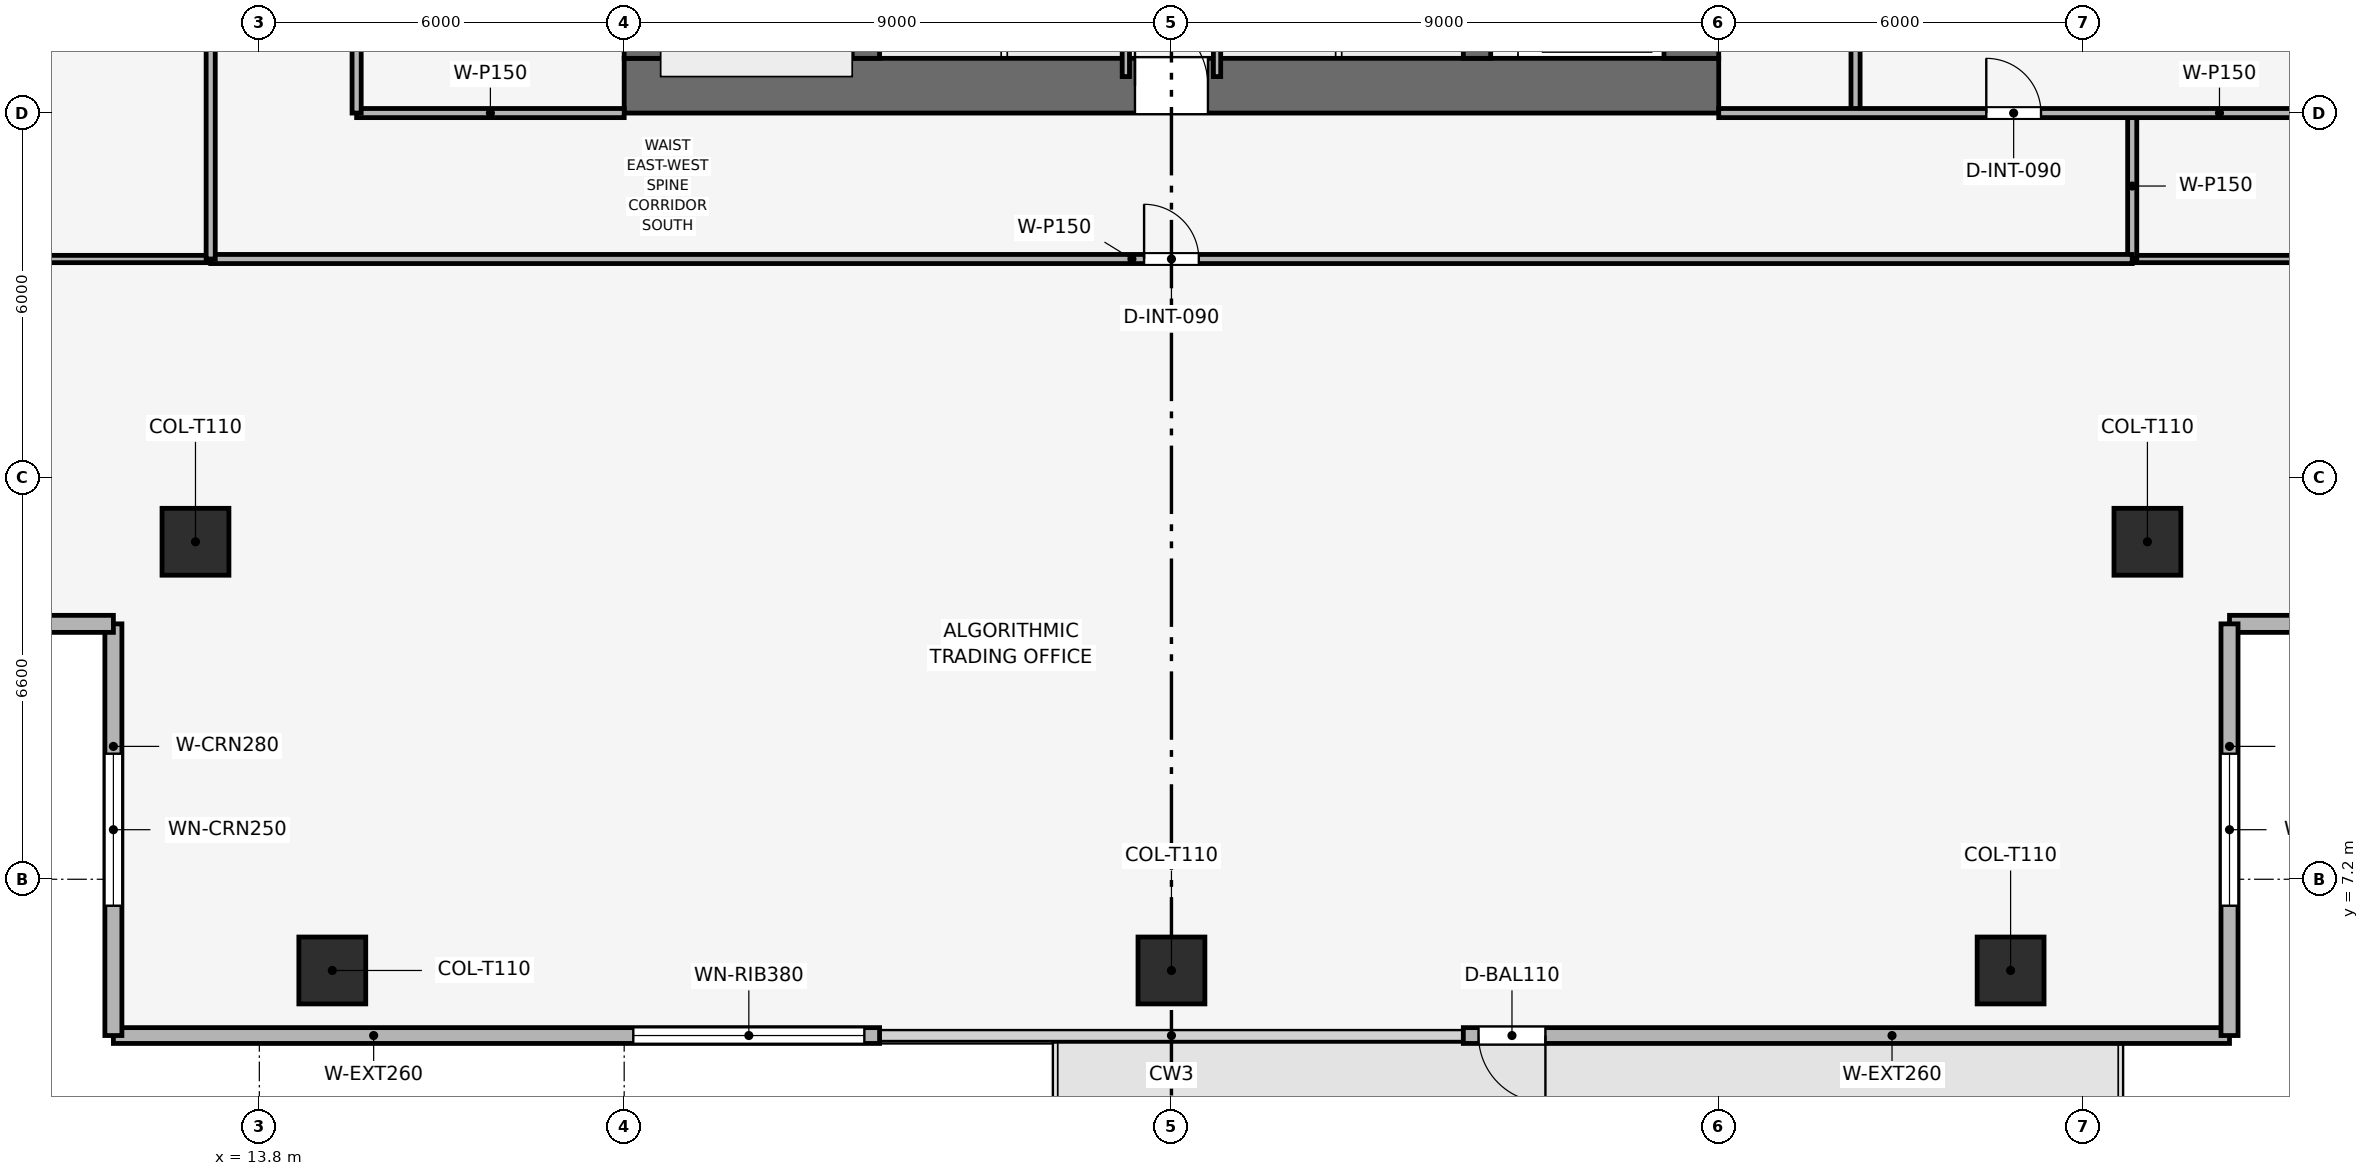
"""IFC4 building model, lengths in metres.
Left out: names, types, materials, properties, quantities, classifications, styles, units other than length and angle.
Written with IfcOpenShell. Run it as: python <this file> out.ifc"""

import sys

from ifc_helpers import new_model, si_unit, direction, frame, frame_2d, origin, origin_2d, place, context, subcontext, project, spatial, rectangle, extrude, element, fill, save


model = new_model("IFC4")
c1 = context("Model", 3, precision=1e-05, world=origin(), true_north=direction((0.0, 1.0)))
c2 = subcontext(c1, "Body", "Model", "MODEL_VIEW")
j1 = project(units=[si_unit("LENGTHUNIT", "METRE"), si_unit("PLANEANGLEUNIT", "RADIAN")], contexts=[c1])
p1 = place(None, origin())
s1 = spatial("IfcSite", under=j1, at=p1, CompositionType="ELEMENT")
p2 = place(p1, origin())
s2 = spatial("IfcBuilding", under=s1, at=p2, CompositionType="ELEMENT")
p3 = place(p2, frame((0.0, 0.0, 157.05)))
s3 = spatial("IfcBuildingStorey", under=s2, at=p3, CompositionType="ELEMENT", Elevation=157.05)
p4 = place(p3, frame((19.8, 20.25, 0.0), z_axis=(0.0, 0.0, 1.0), x_axis=(1.0, 0.0, 0.0)))
e1 = element("IfcWall", 1, at=p4, inside=s3, PredefinedType="SHEAR", context=c2, shape_type="SweptSolid", body=[
    extrude(rectangle(XDim=18.0, YDim=0.9, at=frame_2d((9.0, 0.0))), origin(), (0.0, 0.0, 1.0), 3.75),
])
p5 = place(p4, frame((8.4, 0.0, 0.0)))
e2 = element("IfcOpeningElement", 2, at=p5, cuts=e1, PredefinedType="OPENING", context=c2, shape_type="SweptSolid", body=[
    extrude(rectangle(XDim=1.2, YDim=2.2, at=frame_2d((0.6, 1.1))), frame((0.0, 0.46, 0.0), z_axis=(0.0, -1.0, 0.0), x_axis=(1.0, 0.0, 0.0)), (0.0, 0.0, 1.0), 0.92),
])
p6 = place(p3, frame((20.25, 20.7, 0.0), z_axis=(0.0, 0.0, 1.0), x_axis=(0.0, 1.0, 0.0)))
e3 = element("IfcWall", 3, at=p6, inside=s3, PredefinedType="SHEAR", context=c2, shape_type="SweptSolid", body=[
    extrude(rectangle(XDim=16.2, YDim=0.9, at=frame_2d((8.1, 0.0))), origin(), (0.0, 0.0, 1.0), 3.75),
])
p7 = place(p6, frame((10.1, 0.0, 0.0)))
e4 = element("IfcOpeningElement", 4, at=p7, cuts=e3, PredefinedType="OPENING", context=c2, shape_type="SweptSolid", body=[
    extrude(rectangle(XDim=1.1, YDim=2.15, at=frame_2d((0.55, 1.075))), frame((0.0, 0.46, 0.0), z_axis=(0.0, -1.0, 0.0), x_axis=(1.0, 0.0, 0.0)), (0.0, 0.0, 1.0), 0.92),
])
p8 = place(p3, frame((37.35, 20.7, 0.0), z_axis=(0.0, 0.0, 1.0), x_axis=(0.0, 1.0, 0.0)))
e5 = element("IfcWall", 5, at=p8, inside=s3, PredefinedType="SHEAR", context=c2, shape_type="SweptSolid", body=[
    extrude(rectangle(XDim=16.2, YDim=0.9, at=frame_2d((8.1, 0.0))), origin(), (0.0, 0.0, 1.0), 3.75),
])
p9 = place(p8, frame((4.6, 0.0, 0.0)))
e6 = element("IfcOpeningElement", 6, at=p9, cuts=e5, PredefinedType="OPENING", context=c2, shape_type="SweptSolid", body=[
    extrude(rectangle(XDim=1.1, YDim=2.15, at=frame_2d((0.55, 1.075))), frame((0.0, 0.46, 0.0), z_axis=(0.0, -1.0, 0.0), x_axis=(1.0, 0.0, 0.0)), (0.0, 0.0, 1.0), 0.92),
])
for number, where, z_axis, x_axis in (
    (7, (23.775, 20.7, 0.0), (0.0, 0.0, 1.0), (0.0, 1.0, 0.0)),
    (8, (33.825, 20.7, 0.0), (0.0, 0.0, 1.0), (0.0, 1.0, 0.0)),
):
    element("IfcWall", number, at=place(p3, frame(where, z_axis=z_axis, x_axis=x_axis)), inside=s3, PredefinedType="SHEAR", context=c2, shape_type="SweptSolid", body=[
        extrude(rectangle(XDim=16.2, YDim=0.45, at=frame_2d((8.1, 0.0))), origin(), (0.0, 0.0, 1.0), 3.75),
    ])
for number, where, z_axis, x_axis in (
    (9, (15.0, 5.7, 0.003), (0.0, 0.0, 1.0), (1.0, 0.0, 0.0)),
    (10, (28.8, 5.7, 0.003), (0.0, 0.0, 1.0), (1.0, 0.0, 0.0)),
    (11, (42.6, 5.7, 0.003), (0.0, 0.0, 1.0), (1.0, 0.0, 0.0)),
    (12, (12.75, 12.75, 0.003), (0.0, 0.0, 1.0), (1.0, 0.0, 0.0)),
    (13, (44.85, 12.75, 0.003), (0.0, 0.0, 1.0), (1.0, 0.0, 0.0)),
):
    element("IfcColumn", number, at=place(p3, frame(where, z_axis=z_axis, x_axis=x_axis)), inside=s3, PredefinedType="COLUMN", context=c2, shape_type="SweptSolid", body=[
        extrude(rectangle(XDim=1.1, YDim=1.1, at=origin_2d()), origin(), (0.0, 0.0, 1.0), 3.489),
    ])
p10 = place(p3, frame((46.2, 4.63, 0.0), z_axis=(0.0, 0.0, 1.0), x_axis=(-1.0, 0.0, 0.0)))
e14 = element("IfcWall", 14, at=p10, inside=s3, PredefinedType="SOLIDWALL", context=c2, shape_type="SweptSolid", body=[
    extrude(rectangle(XDim=12.6, YDim=0.26, at=frame_2d((6.3, 0.0))), origin(), (0.0, 0.0, 1.0), 3.495),
])
p11 = place(p10, frame((11.25, 0.0, 0.0)))
e15 = element("IfcOpeningElement", 15, at=p11, cuts=e14, PredefinedType="OPENING", context=c2, shape_type="SweptSolid", body=[
    extrude(rectangle(XDim=1.1, YDim=2.2, at=frame_2d((0.55, 1.1))), frame((0.0, 0.14, 0.0), z_axis=(0.0, -1.0, 0.0), x_axis=(1.0, 0.0, 0.0)), (0.0, 0.0, 1.0), 0.28),
])
p12 = place(p3, frame((24.0, 4.63, 0.0), z_axis=(0.0, 0.0, 1.0), x_axis=(-1.0, 0.0, 0.0)))
e16 = element("IfcWall", 16, at=p12, inside=s3, PredefinedType="SOLIDWALL", context=c2, shape_type="SweptSolid", body=[
    extrude(rectangle(XDim=12.6, YDim=0.26, at=frame_2d((6.3, 0.0))), origin(), (0.0, 0.0, 1.0), 3.495),
])
p13 = place(p12, frame((0.25, 0.0, 0.9)))
e17 = element("IfcOpeningElement", 17, at=p13, cuts=e16, PredefinedType="OPENING", context=c2, shape_type="SweptSolid", body=[
    extrude(rectangle(XDim=3.8, YDim=1.9, at=frame_2d((1.9, 0.95))), frame((0.0, 0.14, 0.0), z_axis=(0.0, -1.0, 0.0), x_axis=(1.0, 0.0, 0.0)), (0.0, 0.0, 1.0), 0.28),
])
p14 = place(p3, frame((11.4, 4.63, 0.0), z_axis=(0.0, 0.0, 1.0), x_axis=(0.0, 1.0, 0.0)))
e18 = element("IfcWall", 18, at=p14, inside=s3, PredefinedType="SOLIDWALL", context=c2, shape_type="SweptSolid", body=[
    extrude(rectangle(XDim=6.77, YDim=0.28, at=frame_2d((3.385, 0.0))), origin(), (0.0, 0.0, 1.0), 3.495),
])
p15 = place(p14, frame((2.135, 0.0, 0.9)))
e19 = element("IfcOpeningElement", 19, at=p15, cuts=e18, PredefinedType="OPENING", context=c2, shape_type="SweptSolid", body=[
    extrude(rectangle(XDim=2.5, YDim=1.9, at=frame_2d((1.25, 0.95))), frame((0.0, 0.15, 0.0), z_axis=(0.0, -1.0, 0.0), x_axis=(1.0, 0.0, 0.0)), (0.0, 0.0, 1.0), 0.3),
])
p16 = place(p3, frame((11.4, 11.4, 0.0), z_axis=(0.0, 0.0, 1.0), x_axis=(-1.0, 0.0, 0.0)))
e20 = element("IfcWall", 20, at=p16, inside=s3, PredefinedType="SOLIDWALL", context=c2, shape_type="SweptSolid", body=[
    extrude(rectangle(XDim=6.77, YDim=0.28, at=frame_2d((3.385, 0.0))), origin(), (0.0, 0.0, 1.0), 3.495),
])
p17 = place(p16, frame((2.135, 0.0, 0.9)))
e21 = element("IfcOpeningElement", 21, at=p17, cuts=e20, PredefinedType="OPENING", context=c2, shape_type="SweptSolid", body=[
    extrude(rectangle(XDim=2.5, YDim=1.9, at=frame_2d((1.25, 0.95))), frame((0.0, 0.15, 0.0), z_axis=(0.0, -1.0, 0.0), x_axis=(1.0, 0.0, 0.0)), (0.0, 0.0, 1.0), 0.3),
])
p18 = place(p3, frame((52.97, 11.4, 0.0), z_axis=(0.0, 0.0, 1.0), x_axis=(-1.0, 0.0, 0.0)))
e22 = element("IfcWall", 22, at=p18, inside=s3, PredefinedType="SOLIDWALL", context=c2, shape_type="SweptSolid", body=[
    extrude(rectangle(XDim=6.77, YDim=0.28, at=frame_2d((3.385, 0.0))), origin(), (0.0, 0.0, 1.0), 3.495),
])
p19 = place(p18, frame((2.135, 0.0, 0.9)))
e23 = element("IfcOpeningElement", 23, at=p19, cuts=e22, PredefinedType="OPENING", context=c2, shape_type="SweptSolid", body=[
    extrude(rectangle(XDim=2.5, YDim=1.9, at=frame_2d((1.25, 0.95))), frame((0.0, 0.15, 0.0), z_axis=(0.0, -1.0, 0.0), x_axis=(1.0, 0.0, 0.0)), (0.0, 0.0, 1.0), 0.3),
])
p20 = place(p3, frame((46.2, 11.4, 0.0), z_axis=(0.0, 0.0, 1.0), x_axis=(0.0, -1.0, 0.0)))
e24 = element("IfcWall", 24, at=p20, inside=s3, PredefinedType="SOLIDWALL", context=c2, shape_type="SweptSolid", body=[
    extrude(rectangle(XDim=6.77, YDim=0.28, at=frame_2d((3.385, 0.0))), origin(), (0.0, 0.0, 1.0), 3.495),
])
p21 = place(p20, frame((2.135, 0.0, 0.9)))
e25 = element("IfcOpeningElement", 25, at=p21, cuts=e24, PredefinedType="OPENING", context=c2, shape_type="SweptSolid", body=[
    extrude(rectangle(XDim=2.5, YDim=1.9, at=frame_2d((1.25, 0.95))), frame((0.0, 0.15, 0.0), z_axis=(0.0, -1.0, 0.0), x_axis=(1.0, 0.0, 0.0)), (0.0, 0.0, 1.0), 0.3),
])
for number, where, z_axis, x_axis in (
    (26, (28.05, 20.4, 0.0), (0.0, 0.0, 1.0), (0.0, 1.0, 0.0)),
    (27, (29.55, 20.4, 0.0), (0.0, 0.0, 1.0), (0.0, 1.0, 0.0)),
):
    element("IfcWall", number, at=place(p3, frame(where, z_axis=z_axis, x_axis=x_axis)), inside=s3, PredefinedType="PARTITIONING", context=c2, shape_type="SweptSolid", body=[
        extrude(rectangle(XDim=2.75, YDim=0.12, at=frame_2d((1.375, 0.0))), origin(), (0.0, 0.0, 1.0), 3.495),
    ])
p22 = place(p3, frame((15.4, 19.8, 0.0), z_axis=(0.0, 0.0, 1.0), x_axis=(1.0, 0.0, 0.0)))
e28 = element("IfcWall", 28, at=p22, inside=s3, PredefinedType="PARTITIONING", context=c2, shape_type="SweptSolid", body=[
    extrude(rectangle(XDim=4.4, YDim=0.15, at=frame_2d((2.2, 0.0))), origin(), (0.0, 0.0, 1.0), 3.03),
])
p23 = place(p3, frame((15.4, 19.8, 0.0), z_axis=(0.0, 0.0, 1.0), x_axis=(0.0, 1.0, 0.0)))
e29 = element("IfcWall", 29, at=p23, inside=s3, PredefinedType="PARTITIONING", context=c2, shape_type="SweptSolid", body=[
    extrude(rectangle(XDim=10.35, YDim=0.15, at=frame_2d((5.175, 0.0))), origin(), (0.0, 0.0, 1.0), 3.03),
])
p24 = place(p23, frame((1.2, 0.0, 0.0)))
e30 = element("IfcOpeningElement", 30, at=p24, cuts=e29, PredefinedType="OPENING", context=c2, shape_type="SweptSolid", body=[
    extrude(rectangle(XDim=0.9, YDim=2.1, at=frame_2d((0.45, 1.05))), frame((0.0, 0.085, 0.0), z_axis=(0.0, -1.0, 0.0), x_axis=(1.0, 0.0, 0.0)), (0.0, 0.0, 1.0), 0.17),
])
p25 = place(p23, frame((4.7, 0.0, 0.0)))
e31 = element("IfcOpeningElement", 31, at=p25, cuts=e29, PredefinedType="OPENING", context=c2, shape_type="SweptSolid", body=[
    extrude(rectangle(XDim=0.9, YDim=2.1, at=frame_2d((0.45, 1.05))), frame((0.0, 0.085, 0.0), z_axis=(0.0, -1.0, 0.0), x_axis=(1.0, 0.0, 0.0)), (0.0, 0.0, 1.0), 0.17),
])
p26 = place(p23, frame((8.1, 0.0, 0.0)))
e32 = element("IfcOpeningElement", 32, at=p26, cuts=e29, PredefinedType="OPENING", context=c2, shape_type="SweptSolid", body=[
    extrude(rectangle(XDim=0.95, YDim=2.1, at=frame_2d((0.475, 1.05))), frame((0.0, 0.085, 0.0), z_axis=(0.0, -1.0, 0.0), x_axis=(1.0, 0.0, 0.0)), (0.0, 0.0, 1.0), 0.17),
])
p27 = place(p3, frame((40.05, 19.8, 0.0), z_axis=(0.0, 0.0, 1.0), x_axis=(0.0, 1.0, 0.0)))
e33 = element("IfcWall", 33, at=p27, inside=s3, PredefinedType="PARTITIONING", context=c2, shape_type="SweptSolid", body=[
    extrude(rectangle(XDim=7.05, YDim=0.15, at=frame_2d((3.525, 0.0))), origin(), (0.0, 0.0, 1.0), 3.03),
])
p28 = place(p3, frame((4.63, 17.4, 0.0), z_axis=(0.0, 0.0, 1.0), x_axis=(1.0, 0.0, 0.0)))
e34 = element("IfcWall", 34, at=p28, inside=s3, PredefinedType="PARTITIONING", context=c2, shape_type="SweptSolid", body=[
    extrude(rectangle(XDim=8.37, YDim=0.12, at=frame_2d((4.185, 0.0))), origin(), (0.0, 0.0, 1.0), 2.98),
])
p29 = place(p3, frame((44.6, 17.4, 0.0), z_axis=(0.0, 0.0, 1.0), x_axis=(1.0, 0.0, 0.0)))
e35 = element("IfcWall", 35, at=p29, inside=s3, PredefinedType="PARTITIONING", context=c2, shape_type="SweptSolid", body=[
    extrude(rectangle(XDim=8.37, YDim=0.12, at=frame_2d((4.185, 0.0))), origin(), (0.0, 0.0, 1.0), 2.98),
])
p30 = place(p3, frame((44.6, 17.4, 0.0), z_axis=(0.0, 0.0, 1.0), x_axis=(0.0, 1.0, 0.0)))
e36 = element("IfcWall", 36, at=p30, inside=s3, PredefinedType="PARTITIONING", context=c2, shape_type="SweptSolid", body=[
    extrude(rectangle(XDim=2.4, YDim=0.15, at=frame_2d((1.2, 0.0))), origin(), (0.0, 0.0, 1.0), 3.495),
])
p31 = place(p3, frame((37.8, 19.8, 0.0), z_axis=(0.0, 0.0, 1.0), x_axis=(1.0, 0.0, 0.0)))
e37 = element("IfcWall", 37, at=p31, inside=s3, PredefinedType="PARTITIONING", context=c2, shape_type="SweptSolid", body=[
    extrude(rectangle(XDim=15.17, YDim=0.15, at=frame_2d((7.585, 0.0))), origin(), (0.0, 0.0, 1.0), 2.98),
])
p32 = place(p31, frame((4.4, 0.0, 0.0)))
e38 = element("IfcOpeningElement", 38, at=p32, cuts=e37, PredefinedType="OPENING", context=c2, shape_type="SweptSolid", body=[
    extrude(rectangle(XDim=0.9, YDim=2.1, at=frame_2d((0.45, 1.05))), frame((0.0, 0.085, 0.0), z_axis=(0.0, -1.0, 0.0), x_axis=(1.0, 0.0, 0.0)), (0.0, 0.0, 1.0), 0.17),
])
p33 = place(p3, frame((13.0, 17.4, 0.0), z_axis=(0.0, 0.0, 1.0), x_axis=(1.0, 0.0, 0.0)))
e39 = element("IfcWall", 39, at=p33, inside=s3, PredefinedType="PARTITIONING", context=c2, shape_type="SweptSolid", body=[
    extrude(rectangle(XDim=31.6, YDim=0.15, at=frame_2d((15.8, 0.0))), origin(), (0.0, 0.0, 1.0), 3.03),
])
p34 = place(p33, frame((15.35, 0.0, 0.0)))
e40 = element("IfcOpeningElement", 40, at=p34, cuts=e39, PredefinedType="OPENING", context=c2, shape_type="SweptSolid", body=[
    extrude(rectangle(XDim=0.9, YDim=2.1, at=frame_2d((0.45, 1.05))), frame((0.0, 0.085, 0.0), z_axis=(0.0, -1.0, 0.0), x_axis=(1.0, 0.0, 0.0)), (0.0, 0.0, 1.0), 0.17),
])
p35 = place(p3, frame((13.0, 17.4, 0.0), z_axis=(0.0, 0.0, 1.0), x_axis=(0.0, 1.0, 0.0)))
e41 = element("IfcWall", 41, at=p35, inside=s3, PredefinedType="PARTITIONING", context=c2, shape_type="SweptSolid", body=[
    extrude(rectangle(XDim=22.8, YDim=0.15, at=frame_2d((11.4, 0.0))), origin(), (0.0, 0.0, 1.0), 3.03),
])
p36 = place(p35, frame((10.95, 0.0, 0.0)))
e42 = element("IfcOpeningElement", 42, at=p36, cuts=e41, PredefinedType="OPENING", context=c2, shape_type="SweptSolid", body=[
    extrude(rectangle(XDim=0.9, YDim=2.1, at=frame_2d((0.45, 1.05))), frame((0.0, 0.085, 0.0), z_axis=(0.0, -1.0, 0.0), x_axis=(1.0, 0.0, 0.0)), (0.0, 0.0, 1.0), 0.17),
])
p37 = place(p11, origin())
e43 = element("IfcDoor", 43, at=p37, inside=s3, OperationType="SINGLE_SWING_LEFT", PredefinedType="DOOR", context=c2, shape_type="SweptSolid", body=[
    extrude(rectangle(XDim=1.1, YDim=2.2, at=frame_2d((0.55, 1.1))), frame((0.0, 0.025, 0.0), z_axis=(0.0, -1.0, 0.0), x_axis=(1.0, 0.0, 0.0)), (0.0, 0.0, 1.0), 0.05),
])
fill(e15, e43)
p38 = place(p13, origin())
e44 = element("IfcWindow", 44, at=p38, inside=s3, PartitioningType="SINGLE_PANEL", PredefinedType="WINDOW", context=c2, shape_type="SweptSolid", body=[
    extrude(rectangle(XDim=3.8, YDim=1.9, at=frame_2d((1.9, 0.95))), frame((0.0, 0.03, 0.0), z_axis=(0.0, -1.0, 0.0), x_axis=(1.0, 0.0, 0.0)), (0.0, 0.0, 1.0), 0.06),
])
fill(e17, e44)
p39 = place(p15, origin())
e45 = element("IfcWindow", 45, at=p39, inside=s3, PartitioningType="SINGLE_PANEL", PredefinedType="WINDOW", context=c2, shape_type="SweptSolid", body=[
    extrude(rectangle(XDim=2.5, YDim=1.9, at=frame_2d((1.25, 0.95))), frame((0.0, 0.03, 0.0), z_axis=(0.0, -1.0, 0.0), x_axis=(1.0, 0.0, 0.0)), (0.0, 0.0, 1.0), 0.06),
])
fill(e19, e45)
p40 = place(p21, origin())
e46 = element("IfcWindow", 46, at=p40, inside=s3, PartitioningType="SINGLE_PANEL", PredefinedType="WINDOW", context=c2, shape_type="SweptSolid", body=[
    extrude(rectangle(XDim=2.5, YDim=1.9, at=frame_2d((1.25, 0.95))), frame((0.0, 0.03, 0.0), z_axis=(0.0, -1.0, 0.0), x_axis=(1.0, 0.0, 0.0)), (0.0, 0.0, 1.0), 0.06),
])
fill(e25, e46)
p41 = place(p32, origin())
e47 = element("IfcDoor", 47, at=p41, inside=s3, OperationType="SINGLE_SWING_LEFT", PredefinedType="DOOR", context=c2, shape_type="SweptSolid", body=[
    extrude(rectangle(XDim=0.9, YDim=2.1, at=frame_2d((0.45, 1.05))), frame((0.0, 0.025, 0.0), z_axis=(0.0, -1.0, 0.0), x_axis=(1.0, 0.0, 0.0)), (0.0, 0.0, 1.0), 0.05),
])
fill(e38, e47)
p42 = place(p34, origin())
e48 = element("IfcDoor", 48, at=p42, inside=s3, OperationType="SINGLE_SWING_LEFT", PredefinedType="DOOR", context=c2, shape_type="SweptSolid", body=[
    extrude(rectangle(XDim=0.9, YDim=2.1, at=frame_2d((0.45, 1.05))), frame((0.0, 0.025, 0.0), z_axis=(0.0, -1.0, 0.0), x_axis=(1.0, 0.0, 0.0)), (0.0, 0.0, 1.0), 0.05),
])
fill(e40, e48)
p43 = place(p5, origin())
e49 = element("IfcDoor", 49, at=p43, inside=s3, OperationType="SINGLE_SWING_LEFT", PredefinedType="DOOR", context=c2, shape_type="SweptSolid", body=[
    extrude(rectangle(XDim=1.2, YDim=2.2, at=frame_2d((0.6, 1.1))), frame((0.0, 0.025, 0.0), z_axis=(0.0, -1.0, 0.0), x_axis=(1.0, 0.0, 0.0)), (0.0, 0.0, 1.0), 0.05),
])
fill(e2, e49)
save(model, sys.argv[1])
